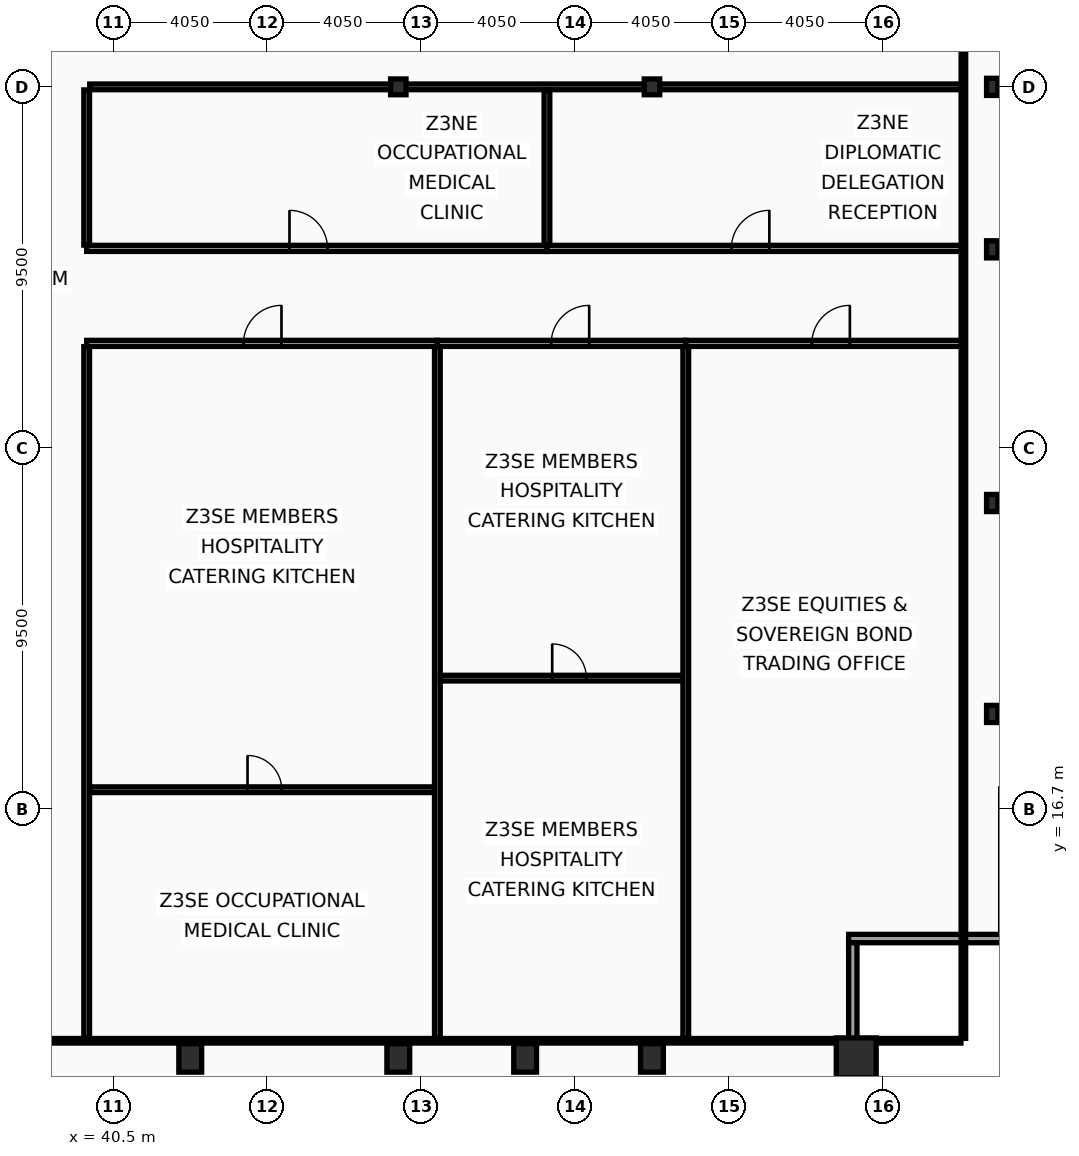
"""IFC4 building model, lengths in metres.
Left out: names, types, materials, properties, quantities, classifications, styles, units other than length and angle.
Written with IfcOpenShell. Run it as: python <this file> out.ifc"""

import sys

from ifc_helpers import new_model, si_unit, direction, frame, frame_2d, origin, origin_2d, place, context, subcontext, project, spatial, rectangle, hollow_rectangle, i_section, extrude, element, fill, save


model = new_model("IFC4")
c1 = context("Model", 3, precision=1e-05, world=origin(), true_north=direction((0.0, 1.0)))
c2 = subcontext(c1, "Body", "Model", "MODEL_VIEW")
j1 = project(units=[si_unit("LENGTHUNIT", "METRE"), si_unit("PLANEANGLEUNIT", "RADIAN")], contexts=[c1])
p1 = place(None, origin())
s1 = spatial("IfcSite", under=j1, at=p1, CompositionType="ELEMENT")
p2 = place(p1, origin())
s2 = spatial("IfcBuilding", under=s1, at=p2, CompositionType="ELEMENT")
p3 = place(p2, frame((0.0, 0.0, 253.4)))
s3 = spatial("IfcBuildingStorey", under=s2, at=p3, CompositionType="ELEMENT", Elevation=253.4)
p4 = place(p3, frame((60.05, 10.15, 0.0), z_axis=(0.0, 0.0, 1.0), x_axis=(1.0, 0.0, 0.0)))
e1 = element("IfcColumn", 1, at=p4, inside=s3, PredefinedType="COLUMN", context=c2, shape_type="SweptSolid", body=[
    extrude(hollow_rectangle(XDim=1.05, YDim=1.05, WallThickness=0.055, at=origin_2d()), origin(), (0.0, 0.0, 1.0), 3.6),
])
for number, where, z_axis, x_axis in (
    (2, (42.525, 10.15, 0.0), (0.0, 0.0, 1.0), (1.0, 0.0, 0.0)),
    (3, (48.0, 10.15, 0.0), (0.0, 0.0, 1.0), (1.0, 0.0, 0.0)),
    (4, (51.337, 10.15, 0.0), (0.0, 0.0, 1.0), (1.0, 0.0, 0.0)),
    (5, (54.675, 10.15, 0.0), (0.0, 0.0, 1.0), (1.0, 0.0, 0.0)),
):
    element("IfcColumn", number, at=place(p3, frame(where, z_axis=z_axis, x_axis=x_axis)), inside=s3, PredefinedType="COLUMN", context=c2, shape_type="SweptSolid", body=[
        extrude(hollow_rectangle(XDim=0.6, YDim=0.75, WallThickness=0.045, at=origin_2d()), origin(), (0.0, 0.0, 1.0), 3.6),
    ])
for number, where, z_axis, x_axis in (
    (6, (63.63, 19.2, 0.0), (0.0, 0.0, 1.0), (1.0, 0.0, 0.0)),
    (7, (63.63, 24.75, 0.0), (0.0, 0.0, 1.0), (1.0, 0.0, 0.0)),
    (8, (63.63, 31.425, 0.0), (0.0, 0.0, 1.0), (1.0, 0.0, 0.0)),
    (9, (63.63, 35.7, 0.0), (0.0, 0.0, 1.0), (1.0, 0.0, 0.0)),
):
    element("IfcColumn", number, at=place(p3, frame(where, z_axis=z_axis, x_axis=x_axis)), inside=s3, PredefinedType="COLUMN", context=c2, shape_type="SweptSolid", body=[
        extrude(i_section(OverallWidth=0.3, OverallDepth=0.45, WebThickness=0.014, FlangeThickness=0.026, at=origin_2d()), origin(), (0.0, 0.0, 1.0), 3.6),
    ])
for number, where, z_axis, x_axis in (
    (10, (48.0, 35.7, 0.0), (0.0, 0.0, 1.0), (1.0, 0.0, 0.0)),
    (11, (54.675, 35.7, 0.0), (0.0, 0.0, 1.0), (1.0, 0.0, 0.0)),
):
    element("IfcColumn", number, at=place(p3, frame(where, z_axis=z_axis, x_axis=x_axis)), inside=s3, PredefinedType="COLUMN", context=c2, shape_type="SweptSolid", body=[
        extrude(i_section(OverallWidth=0.406, OverallDepth=0.416, WebThickness=0.03, FlangeThickness=0.048, at=origin_2d()), origin(), (0.0, 0.0, 1.0), 3.6),
    ])
p5 = place(p3, frame((64.07, 13.29, 0.0), z_axis=(0.0, 0.0, 1.0), x_axis=(-1.0, 0.0, 0.0)))
e12 = element("IfcWall", 12, at=p5, inside=s3, PredefinedType="SOLIDWALL", context=c2, shape_type="SweptSolid", body=[
    extrude(rectangle(XDim=4.22, YDim=0.22, at=frame_2d((2.11, 0.0))), origin(), (0.0, 0.0, 1.0), 2.77),
])
p6 = place(p3, frame((59.96, 13.18, 0.0), z_axis=(0.0, 0.0, 1.0), x_axis=(0.0, -1.0, 0.0)))
e13 = element("IfcWall", 13, at=p6, inside=s3, PredefinedType="SOLIDWALL", context=c2, shape_type="SweptSolid", body=[
    extrude(rectangle(XDim=3.91, YDim=0.22, at=frame_2d((1.955, 0.0))), origin(), (0.0, 0.0, 1.0), 2.77),
])
p7 = place(p3, frame((39.8, 10.665, 0.0), z_axis=(0.0, 0.0, 1.0), x_axis=(0.0, 1.0, 0.0)))
e14 = element("IfcWall", 14, at=p7, inside=s3, PredefinedType="PARTITIONING", context=c2, shape_type="SweptSolid", body=[
    extrude(rectangle(XDim=18.2, YDim=0.15, at=frame_2d((9.1, 0.0))), origin(), (0.0, 0.0, 1.0), 2.97),
])
p8 = place(p3, frame((39.8, 31.535, 0.0), z_axis=(0.0, 0.0, 1.0), x_axis=(0.0, 1.0, 0.0)))
e15 = element("IfcWall", 15, at=p8, inside=s3, PredefinedType="PARTITIONING", context=c2, shape_type="SweptSolid", body=[
    extrude(rectangle(XDim=4.085, YDim=0.15, at=frame_2d((2.042, 0.0))), origin(), (0.0, 0.0, 1.0), 2.97),
])
p9 = place(p3, frame((39.88, 35.7, 0.0), z_axis=(0.0, 0.0, 1.0), x_axis=(1.0, 0.0, 0.0)))
e16 = element("IfcWall", 16, at=p9, inside=s3, PredefinedType="PARTITIONING", context=c2, shape_type="SweptSolid", body=[
    extrude(rectangle(XDim=22.925, YDim=0.15, at=frame_2d((11.462, 0.0))), origin(), (0.0, 0.0, 1.0), 2.72),
])
p10 = place(p3, frame((39.8, 28.95, 0.0), z_axis=(0.0, 0.0, 1.0), x_axis=(1.0, 0.0, 0.0)))
e17 = element("IfcWall", 17, at=p10, inside=s3, PredefinedType="PARTITIONING", context=c2, shape_type="SweptSolid", body=[
    extrude(rectangle(XDim=9.228, YDim=0.16, at=frame_2d((4.614, 0.0))), origin(), (0.0, 0.0, 1.0), 2.72),
])
p11 = place(p10, frame((4.126, 0.0, 0.0)))
e18 = element("IfcOpeningElement", 18, at=p11, cuts=e17, PredefinedType="OPENING", context=c2, shape_type="SweptSolid", body=[
    extrude(rectangle(XDim=1.0, YDim=2.05, at=frame_2d((0.5, 1.025))), frame((0.0, 0.09, 0.0), z_axis=(0.0, -1.0, 0.0), x_axis=(1.0, 0.0, 0.0)), (0.0, 0.0, 1.0), 0.18),
])
p12 = place(p3, frame((39.88, 17.206, 0.0), z_axis=(0.0, 0.0, 1.0), x_axis=(1.0, 0.0, 0.0)))
e19 = element("IfcWall", 19, at=p12, inside=s3, PredefinedType="PARTITIONING", context=c2, shape_type="SweptSolid", body=[
    extrude(rectangle(XDim=9.068, YDim=0.15, at=frame_2d((4.534, 0.0))), origin(), (0.0, 0.0, 1.0), 2.72),
])
p13 = place(p12, frame((4.153, 0.0, 0.0)))
e20 = element("IfcOpeningElement", 20, at=p13, cuts=e19, PredefinedType="OPENING", context=c2, shape_type="SweptSolid", body=[
    extrude(rectangle(XDim=0.9, YDim=2.05, at=frame_2d((0.45, 1.025))), frame((0.0, 0.085, 0.0), z_axis=(0.0, -1.0, 0.0), x_axis=(1.0, 0.0, 0.0)), (0.0, 0.0, 1.0), 0.17),
])
p14 = place(p3, frame((49.028, 28.95, 0.0), z_axis=(0.0, 0.0, 1.0), x_axis=(1.0, 0.0, 0.0)))
e21 = element("IfcWall", 21, at=p14, inside=s3, PredefinedType="PARTITIONING", context=c2, shape_type="SweptSolid", body=[
    extrude(rectangle(XDim=6.536, YDim=0.16, at=frame_2d((3.268, 0.0))), origin(), (0.0, 0.0, 1.0), 2.72),
])
p15 = place(p14, frame((2.995, 0.0, 0.0)))
e22 = element("IfcOpeningElement", 22, at=p15, cuts=e21, PredefinedType="OPENING", context=c2, shape_type="SweptSolid", body=[
    extrude(rectangle(XDim=1.0, YDim=2.05, at=frame_2d((0.5, 1.025))), frame((0.0, 0.09, 0.0), z_axis=(0.0, -1.0, 0.0), x_axis=(1.0, 0.0, 0.0)), (0.0, 0.0, 1.0), 0.18),
])
p16 = place(p3, frame((49.028, 10.665, 0.0), z_axis=(0.0, 0.0, 1.0), x_axis=(0.0, 1.0, 0.0)))
e23 = element("IfcWall", 23, at=p16, inside=s3, PredefinedType="PARTITIONING", context=c2, shape_type="SweptSolid", body=[
    extrude(rectangle(XDim=18.2, YDim=0.15, at=frame_2d((9.1, 0.0))), origin(), (0.0, 0.0, 1.0), 2.97),
])
p17 = place(p3, frame((49.108, 20.142, 0.0), z_axis=(0.0, 0.0, 1.0), x_axis=(1.0, 0.0, 0.0)))
e24 = element("IfcWall", 24, at=p17, inside=s3, PredefinedType="PARTITIONING", context=c2, shape_type="SweptSolid", body=[
    extrude(rectangle(XDim=6.377, YDim=0.15, at=frame_2d((3.188, 0.0))), origin(), (0.0, 0.0, 1.0), 2.72),
])
p18 = place(p17, frame((2.941, 0.0, 0.0)))
e25 = element("IfcOpeningElement", 25, at=p18, cuts=e24, PredefinedType="OPENING", context=c2, shape_type="SweptSolid", body=[
    extrude(rectangle(XDim=0.9, YDim=2.05, at=frame_2d((0.45, 1.025))), frame((0.0, 0.085, 0.0), z_axis=(0.0, -1.0, 0.0), x_axis=(1.0, 0.0, 0.0)), (0.0, 0.0, 1.0), 0.17),
])
p19 = place(p3, frame((55.564, 28.95, 0.0), z_axis=(0.0, 0.0, 1.0), x_axis=(1.0, 0.0, 0.0)))
e26 = element("IfcWall", 26, at=p19, inside=s3, PredefinedType="PARTITIONING", context=c2, shape_type="SweptSolid", body=[
    extrude(rectangle(XDim=7.306, YDim=0.16, at=frame_2d((3.653, 0.0))), origin(), (0.0, 0.0, 1.0), 3.38),
])
p20 = place(p19, frame((3.318, 0.0, 0.0)))
e27 = element("IfcOpeningElement", 27, at=p20, cuts=e26, PredefinedType="OPENING", context=c2, shape_type="SweptSolid", body=[
    extrude(rectangle(XDim=1.0, YDim=2.05, at=frame_2d((0.5, 1.025))), frame((0.0, 0.09, 0.0), z_axis=(0.0, -1.0, 0.0), x_axis=(1.0, 0.0, 0.0)), (0.0, 0.0, 1.0), 0.18),
])
p21 = place(p3, frame((55.564, 10.665, 0.0), z_axis=(0.0, 0.0, 1.0), x_axis=(0.0, 1.0, 0.0)))
e28 = element("IfcWall", 28, at=p21, inside=s3, PredefinedType="PARTITIONING", context=c2, shape_type="SweptSolid", body=[
    extrude(rectangle(XDim=18.2, YDim=0.15, at=frame_2d((9.1, 0.0))), origin(), (0.0, 0.0, 1.0), 2.72),
])
p22 = place(p3, frame((39.8, 31.45, 0.0), z_axis=(0.0, 0.0, 1.0), x_axis=(1.0, 0.0, 0.0)))
e29 = element("IfcWall", 29, at=p22, inside=s3, PredefinedType="PARTITIONING", context=c2, shape_type="SweptSolid", body=[
    extrude(rectangle(XDim=12.112, YDim=0.16, at=frame_2d((6.056, 0.0))), origin(), (0.0, 0.0, 1.0), 2.72),
])
p23 = place(p22, frame((5.337, 0.0, 0.0)))
e30 = element("IfcOpeningElement", 30, at=p23, cuts=e29, PredefinedType="OPENING", context=c2, shape_type="SweptSolid", body=[
    extrude(rectangle(XDim=1.0, YDim=2.05, at=frame_2d((0.5, 1.025))), frame((0.0, 0.09, 0.0), z_axis=(0.0, -1.0, 0.0), x_axis=(1.0, 0.0, 0.0)), (0.0, 0.0, 1.0), 0.18),
])
p24 = place(p3, frame((51.912, 31.45, 0.0), z_axis=(0.0, 0.0, 1.0), x_axis=(1.0, 0.0, 0.0)))
e31 = element("IfcWall", 31, at=p24, inside=s3, PredefinedType="PARTITIONING", context=c2, shape_type="SweptSolid", body=[
    extrude(rectangle(XDim=10.958, YDim=0.16, at=frame_2d((5.479, 0.0))), origin(), (0.0, 0.0, 1.0), 2.72),
])
p25 = place(p24, frame((4.853, 0.0, 0.0)))
e32 = element("IfcOpeningElement", 32, at=p25, cuts=e31, PredefinedType="OPENING", context=c2, shape_type="SweptSolid", body=[
    extrude(rectangle(XDim=1.0, YDim=2.05, at=frame_2d((0.5, 1.025))), frame((0.0, 0.09, 0.0), z_axis=(0.0, -1.0, 0.0), x_axis=(1.0, 0.0, 0.0)), (0.0, 0.0, 1.0), 0.18),
])
p26 = place(p3, frame((51.912, 31.535, 0.0), z_axis=(0.0, 0.0, 1.0), x_axis=(0.0, 1.0, 0.0)))
e33 = element("IfcWall", 33, at=p26, inside=s3, PredefinedType="PARTITIONING", context=c2, shape_type="SweptSolid", body=[
    extrude(rectangle(XDim=4.085, YDim=0.15, at=frame_2d((2.042, 0.0))), origin(), (0.0, 0.0, 1.0), 2.97),
])
p27 = place(p3, frame((62.87, 10.665, 0.0), z_axis=(0.0, 0.0, 1.0), x_axis=(0.0, 1.0, 0.0)))
e34 = element("IfcWall", 34, at=p27, inside=s3, PredefinedType="PARTITIONING", context=c2, shape_type="SweptSolid", body=[
    extrude(rectangle(XDim=42.11, YDim=0.12, at=frame_2d((21.055, 0.0))), origin(), (0.0, 0.0, 1.0), 2.72),
])
p28 = place(p3, frame((10.095, 10.6, 0.0), z_axis=(0.0, 0.0, 1.0), x_axis=(1.0, 0.0, 0.0)))
e35 = element("IfcWall", 35, at=p28, inside=s3, PredefinedType="PARTITIONING", context=c2, shape_type="SweptSolid", body=[
    extrude(rectangle(XDim=52.71, YDim=0.12, at=frame_2d((26.355, 0.0))), origin(), (0.0, 0.0, 1.0), 2.72),
])
p29 = place(p11, origin())
e36 = element("IfcDoor", 36, at=p29, inside=s3, OperationType="SINGLE_SWING_RIGHT", PredefinedType="DOOR", context=c2, shape_type="SweptSolid", body=[
    extrude(rectangle(XDim=1.0, YDim=2.05, at=frame_2d((0.5, 1.025))), frame((0.0, 0.025, 0.0), z_axis=(0.0, -1.0, 0.0), x_axis=(1.0, 0.0, 0.0)), (0.0, 0.0, 1.0), 0.05),
])
fill(e18, e36)
p30 = place(p13, origin())
e37 = element("IfcDoor", 37, at=p30, inside=s3, OperationType="SINGLE_SWING_LEFT", PredefinedType="DOOR", context=c2, shape_type="SweptSolid", body=[
    extrude(rectangle(XDim=0.9, YDim=2.05, at=frame_2d((0.45, 1.025))), frame((0.0, 0.025, 0.0), z_axis=(0.0, -1.0, 0.0), x_axis=(1.0, 0.0, 0.0)), (0.0, 0.0, 1.0), 0.05),
])
fill(e20, e37)
p31 = place(p15, origin())
e38 = element("IfcDoor", 38, at=p31, inside=s3, OperationType="SINGLE_SWING_RIGHT", PredefinedType="DOOR", context=c2, shape_type="SweptSolid", body=[
    extrude(rectangle(XDim=1.0, YDim=2.05, at=frame_2d((0.5, 1.025))), frame((0.0, 0.025, 0.0), z_axis=(0.0, -1.0, 0.0), x_axis=(1.0, 0.0, 0.0)), (0.0, 0.0, 1.0), 0.05),
])
fill(e22, e38)
p32 = place(p18, origin())
e39 = element("IfcDoor", 39, at=p32, inside=s3, OperationType="SINGLE_SWING_LEFT", PredefinedType="DOOR", context=c2, shape_type="SweptSolid", body=[
    extrude(rectangle(XDim=0.9, YDim=2.05, at=frame_2d((0.45, 1.025))), frame((0.0, 0.025, 0.0), z_axis=(0.0, -1.0, 0.0), x_axis=(1.0, 0.0, 0.0)), (0.0, 0.0, 1.0), 0.05),
])
fill(e25, e39)
p33 = place(p20, origin())
e40 = element("IfcDoor", 40, at=p33, inside=s3, OperationType="SINGLE_SWING_RIGHT", PredefinedType="DOOR", context=c2, shape_type="SweptSolid", body=[
    extrude(rectangle(XDim=1.0, YDim=2.05, at=frame_2d((0.5, 1.025))), frame((0.0, 0.025, 0.0), z_axis=(0.0, -1.0, 0.0), x_axis=(1.0, 0.0, 0.0)), (0.0, 0.0, 1.0), 0.05),
])
fill(e27, e40)
p34 = place(p23, origin())
e41 = element("IfcDoor", 41, at=p34, inside=s3, OperationType="SINGLE_SWING_LEFT", PredefinedType="DOOR", context=c2, shape_type="SweptSolid", body=[
    extrude(rectangle(XDim=1.0, YDim=2.05, at=frame_2d((0.5, 1.025))), frame((0.0, 0.025, 0.0), z_axis=(0.0, -1.0, 0.0), x_axis=(1.0, 0.0, 0.0)), (0.0, 0.0, 1.0), 0.05),
])
fill(e30, e41)
p35 = place(p25, origin())
e42 = element("IfcDoor", 42, at=p35, inside=s3, OperationType="SINGLE_SWING_RIGHT", PredefinedType="DOOR", context=c2, shape_type="SweptSolid", body=[
    extrude(rectangle(XDim=1.0, YDim=2.05, at=frame_2d((0.5, 1.025))), frame((0.0, 0.025, 0.0), z_axis=(0.0, -1.0, 0.0), x_axis=(1.0, 0.0, 0.0)), (0.0, 0.0, 1.0), 0.05),
])
fill(e32, e42)
save(model, sys.argv[1])
